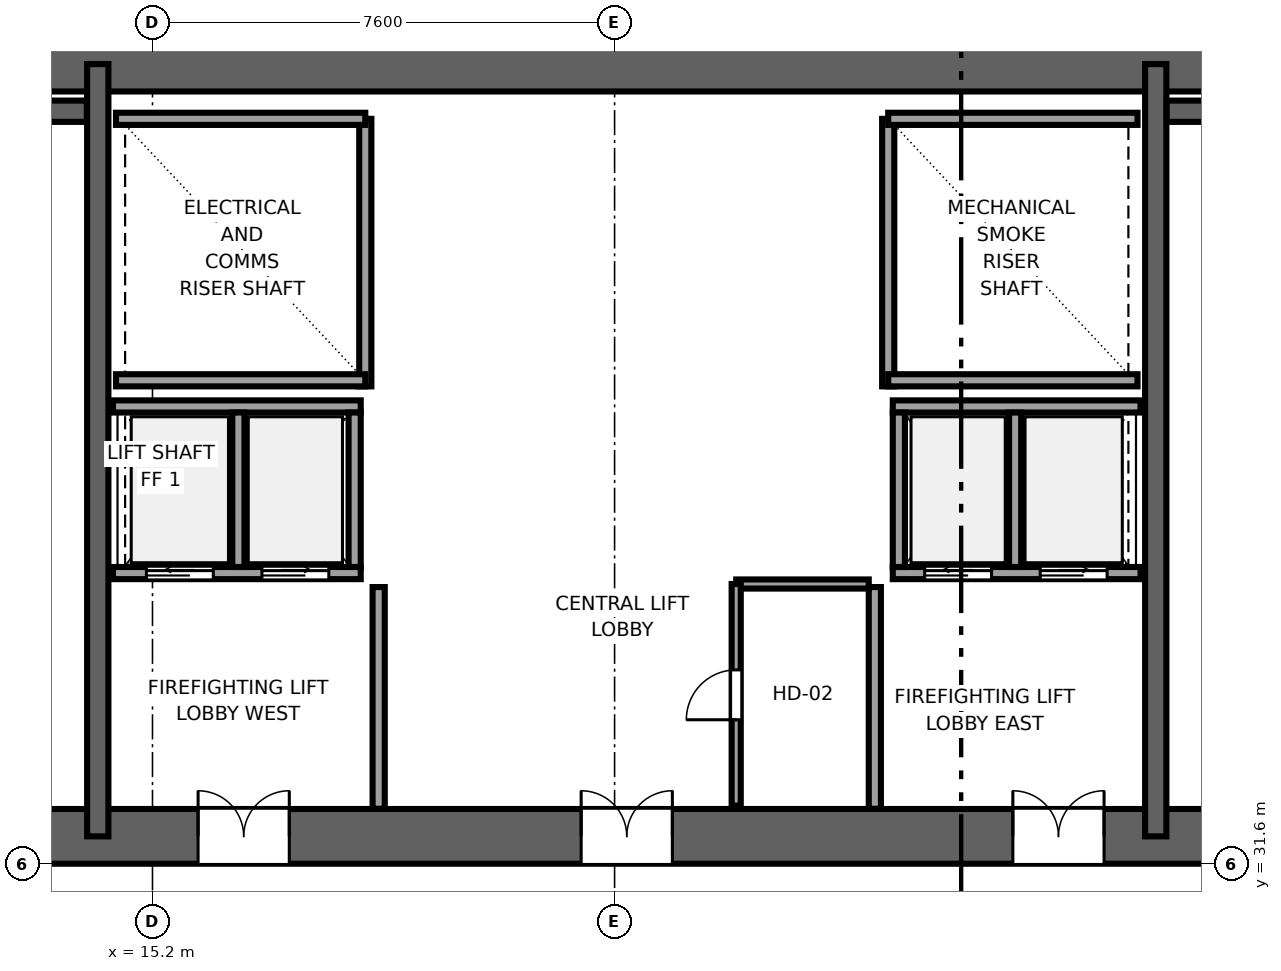
"""IFC4 building model, lengths in metres.
Left out: names, types, materials, properties, quantities, classifications, styles, units other than length and angle.
Written with IfcOpenShell. Run it as: python <this file> out.ifc"""

import sys

from ifc_helpers import new_model, si_unit, direction, frame, frame_2d, origin, place, context, subcontext, project, spatial, rectangle, extrude, source, transform, mapped, element, fill, save


model = new_model("IFC4")
c1 = context("Model", 3, precision=1e-05, world=origin(), true_north=direction((0.0, 1.0)))
c2 = subcontext(c1, "Body", "Model", "MODEL_VIEW")
j1 = project(units=[si_unit("LENGTHUNIT", "METRE"), si_unit("PLANEANGLEUNIT", "RADIAN")], contexts=[c1])
p1 = place(None, origin())
s1 = spatial("IfcSite", under=j1, at=p1, CompositionType="ELEMENT")
p2 = place(p1, origin())
s2 = spatial("IfcBuilding", under=s1, at=p2, CompositionType="ELEMENT")
p3 = place(p2, frame((0.0, 0.0, -9.6)))
s3 = spatial("IfcBuildingStorey", under=s2, at=p3, CompositionType="ELEMENT", Elevation=-9.6)
p4 = place(p3, frame((9.6, 32.05, 0.0), z_axis=(0.0, 0.0, 1.0), x_axis=(1.0, 0.0, 0.0)))
e1 = element("IfcWall", 1, at=p4, inside=s3, PredefinedType="SHEAR", context=c2, shape_type="SweptSolid", body=[
    extrude(rectangle(XDim=26.8, YDim=0.9, at=frame_2d((13.4, 0.0))), origin(), (0.0, 0.0, 1.0), 4.8),
])
p5 = place(p4, frame((7.85, 0.0, 0.0), z_axis=(0.0, 0.0, 1.0), x_axis=(-1.0, 0.0, 0.0)))
e2 = element("IfcOpeningElement", 2, at=p5, cuts=e1, PredefinedType="OPENING", context=c2, shape_type="SweptSolid", body=[
    extrude(rectangle(XDim=1.5, YDim=2.04, at=frame_2d((0.75, 1.02))), frame((0.0, 0.46, 0.0), z_axis=(0.0, -1.0, 0.0), x_axis=(1.0, 0.0, 0.0)), (0.0, 0.0, 1.0), 0.92),
])
p6 = place(p4, frame((14.15, 0.0, 0.0), z_axis=(0.0, 0.0, 1.0), x_axis=(-1.0, 0.0, 0.0)))
e3 = element("IfcOpeningElement", 3, at=p6, cuts=e1, PredefinedType="OPENING", context=c2, shape_type="SweptSolid", body=[
    extrude(rectangle(XDim=1.5, YDim=2.04, at=frame_2d((0.75, 1.02))), frame((0.0, 0.46, 0.0), z_axis=(0.0, -1.0, 0.0), x_axis=(1.0, 0.0, 0.0)), (0.0, 0.0, 1.0), 0.92),
])
p7 = place(p4, frame((21.25, 0.0, 0.0), z_axis=(0.0, 0.0, 1.0), x_axis=(-1.0, 0.0, 0.0)))
e4 = element("IfcOpeningElement", 4, at=p7, cuts=e1, PredefinedType="OPENING", context=c2, shape_type="SweptSolid", body=[
    extrude(rectangle(XDim=1.5, YDim=2.04, at=frame_2d((0.75, 1.02))), frame((0.0, 0.46, 0.0), z_axis=(0.0, -1.0, 0.0), x_axis=(1.0, 0.0, 0.0)), (0.0, 0.0, 1.0), 0.92),
])
p8 = place(p3, frame((9.6, 44.75, 0.0), z_axis=(0.0, 0.0, 1.0), x_axis=(1.0, 0.0, 0.0)))
e5 = element("IfcWall", 5, at=p8, inside=s3, PredefinedType="SHEAR", context=c2, shape_type="SweptSolid", body=[
    extrude(rectangle(XDim=26.8, YDim=0.9, at=frame_2d((13.4, 0.0))), origin(), (0.0, 0.0, 1.0), 4.8),
])
for number, where, z_axis, x_axis in (
    (6, (14.3, 32.05, 0.0), (0.0, 0.0, 1.0), (0.0, 1.0, 0.0)),
    (7, (31.7, 32.05, 0.0), (0.0, 0.0, 1.0), (0.0, 1.0, 0.0)),
):
    element("IfcWall", number, at=place(p3, frame(where, z_axis=z_axis, x_axis=x_axis)), inside=s3, PredefinedType="SHEAR", context=c2, shape_type="SweptSolid", body=[
        extrude(rectangle(XDim=12.7, YDim=0.35, at=frame_2d((6.35, 0.0))), origin(), (0.0, 0.0, 1.0), 4.8),
    ])
for number, where, z_axis, x_axis in (
    (8, (10.52, 43.975, 0.0), (0.0, 0.0, 1.0), (1.0, 0.0, 0.0)),
    (9, (31.88, 43.975, 0.0), (0.0, 0.0, 1.0), (1.0, 0.0, 0.0)),
):
    element("IfcWall", number, at=place(p3, frame(where, z_axis=z_axis, x_axis=x_axis)), inside=s3, PredefinedType="SHEAR", context=c2, shape_type="SweptSolid", body=[
        extrude(rectangle(XDim=3.6, YDim=0.35, at=frame_2d((1.8, 0.0))), origin(), (0.0, 0.0, 1.0), 4.8),
    ])
p9 = place(p3, frame((18.7, 39.45, 0.0), z_axis=(0.0, 0.0, 1.0), x_axis=(0.0, 1.0, 0.0)))
e10 = element("IfcWall", 10, at=p9, inside=s3, PredefinedType="SOLIDWALL", context=c2, shape_type="SweptSolid", body=[
    extrude(rectangle(XDim=4.4, YDim=0.2, at=frame_2d((2.2, 0.0))), origin(), (0.0, 0.0, 1.0), 4.54),
])
for number, where, z_axis, x_axis in (
    (11, (14.6, 39.55, 0.0), (0.0, 0.0, 1.0), (1.0, 0.0, 0.0)),
    (12, (14.6, 43.85, 0.0), (0.0, 0.0, 1.0), (1.0, 0.0, 0.0)),
):
    element("IfcWall", number, at=place(p3, frame(where, z_axis=z_axis, x_axis=x_axis)), inside=s3, PredefinedType="SOLIDWALL", context=c2, shape_type="SweptSolid", body=[
        extrude(rectangle(XDim=4.1, YDim=0.2, at=frame_2d((2.05, 0.0))), origin(), (0.0, 0.0, 1.0), 4.54),
    ])
p10 = place(p3, frame((27.3, 39.45, 0.0), z_axis=(0.0, 0.0, 1.0), x_axis=(0.0, 1.0, 0.0)))
e13 = element("IfcWall", 13, at=p10, inside=s3, PredefinedType="SOLIDWALL", context=c2, shape_type="SweptSolid", body=[
    extrude(rectangle(XDim=4.4, YDim=0.2, at=frame_2d((2.2, 0.0))), origin(), (0.0, 0.0, 1.0), 4.54),
])
for number, where, z_axis, x_axis in (
    (14, (27.3, 39.55, 0.0), (0.0, 0.0, 1.0), (1.0, 0.0, 0.0)),
    (15, (27.3, 43.85, 0.0), (0.0, 0.0, 1.0), (1.0, 0.0, 0.0)),
):
    element("IfcWall", number, at=place(p3, frame(where, z_axis=z_axis, x_axis=x_axis)), inside=s3, PredefinedType="SOLIDWALL", context=c2, shape_type="SweptSolid", body=[
        extrude(rectangle(XDim=4.1, YDim=0.2, at=frame_2d((2.05, 0.0))), origin(), (0.0, 0.0, 1.0), 4.54),
    ])
for number, where, z_axis, x_axis in (
    (16, (18.92, 32.504, 0.0), (0.0, 0.0, 1.0), (0.0, 1.0, 0.0)),
    (17, (27.08, 32.504, 0.0), (0.0, 0.0, 1.0), (0.0, 1.0, 0.0)),
):
    element("IfcWall", number, at=place(p3, frame(where, z_axis=z_axis, x_axis=x_axis)), inside=s3, PredefinedType="SOLIDWALL", context=c2, shape_type="SweptSolid", body=[
        extrude(rectangle(XDim=3.646, YDim=0.2, at=frame_2d((1.823, 0.0))), origin(), (0.0, 0.0, 1.0), 4.54),
    ])
p11 = place(p3, frame((27.375, 36.38, 0.0), z_axis=(0.0, 0.0, 1.0), x_axis=(1.0, 0.0, 0.0)))
e18 = element("IfcWall", 18, at=p11, inside=s3, PredefinedType="SOLIDWALL", context=c2, shape_type="SweptSolid", body=[
    extrude(rectangle(XDim=4.075, YDim=0.2, at=frame_2d((2.038, 0.0))), origin(), (0.0, 0.0, 1.0), 4.54),
])
p12 = place(p11, frame((0.525, 0.0, 0.0)))
e19 = element("IfcOpeningElement", 19, at=p12, cuts=e18, PredefinedType="OPENING", context=c2, shape_type="SweptSolid", body=[
    extrude(rectangle(XDim=1.1, YDim=2.12, at=frame_2d((0.55, 1.06))), frame((0.0, 0.11, 0.0), z_axis=(0.0, -1.0, 0.0), x_axis=(1.0, 0.0, 0.0)), (0.0, 0.0, 1.0), 0.22),
])
p13 = place(p11, frame((2.425, 0.0, 0.0)))
e20 = element("IfcOpeningElement", 20, at=p13, cuts=e18, PredefinedType="OPENING", context=c2, shape_type="SweptSolid", body=[
    extrude(rectangle(XDim=1.1, YDim=2.12, at=frame_2d((0.55, 1.06))), frame((0.0, 0.11, 0.0), z_axis=(0.0, -1.0, 0.0), x_axis=(1.0, 0.0, 0.0)), (0.0, 0.0, 1.0), 0.22),
])
p14 = place(p3, frame((27.375, 39.12, 0.0), z_axis=(0.0, 0.0, 1.0), x_axis=(1.0, 0.0, 0.0)))
e21 = element("IfcWall", 21, at=p14, inside=s3, PredefinedType="SOLIDWALL", context=c2, shape_type="SweptSolid", body=[
    extrude(rectangle(XDim=4.075, YDim=0.2, at=frame_2d((2.038, 0.0))), origin(), (0.0, 0.0, 1.0), 4.54),
])
for number, where, z_axis, x_axis in (
    (22, (27.475, 36.48, 0.0), (0.0, 0.0, 1.0), (0.0, 1.0, 0.0)),
    (23, (29.387, 36.48, 0.0), (0.0, 0.0, 1.0), (0.0, 1.0, 0.0)),
):
    element("IfcWall", number, at=place(p3, frame(where, z_axis=z_axis, x_axis=x_axis)), inside=s3, PredefinedType="SOLIDWALL", context=c2, shape_type="SweptSolid", body=[
        extrude(rectangle(XDim=2.54, YDim=0.2, at=frame_2d((1.27, 0.0))), origin(), (0.0, 0.0, 1.0), 4.54),
    ])
p15 = place(p3, frame((14.55, 36.38, 0.0), z_axis=(0.0, 0.0, 1.0), x_axis=(1.0, 0.0, 0.0)))
e24 = element("IfcWall", 24, at=p15, inside=s3, PredefinedType="SOLIDWALL", context=c2, shape_type="SweptSolid", body=[
    extrude(rectangle(XDim=4.075, YDim=0.2, at=frame_2d((2.038, 0.0))), origin(), (0.0, 0.0, 1.0), 4.54),
])
p16 = place(p15, frame((0.55, 0.0, 0.0)))
e25 = element("IfcOpeningElement", 25, at=p16, cuts=e24, PredefinedType="OPENING", context=c2, shape_type="SweptSolid", body=[
    extrude(rectangle(XDim=1.1, YDim=2.12, at=frame_2d((0.55, 1.06))), frame((0.0, 0.11, 0.0), z_axis=(0.0, -1.0, 0.0), x_axis=(1.0, 0.0, 0.0)), (0.0, 0.0, 1.0), 0.22),
])
p17 = place(p15, frame((2.45, 0.0, 0.0)))
e26 = element("IfcOpeningElement", 26, at=p17, cuts=e24, PredefinedType="OPENING", context=c2, shape_type="SweptSolid", body=[
    extrude(rectangle(XDim=1.1, YDim=2.12, at=frame_2d((0.55, 1.06))), frame((0.0, 0.11, 0.0), z_axis=(0.0, -1.0, 0.0), x_axis=(1.0, 0.0, 0.0)), (0.0, 0.0, 1.0), 0.22),
])
p18 = place(p3, frame((14.55, 39.12, 0.0), z_axis=(0.0, 0.0, 1.0), x_axis=(1.0, 0.0, 0.0)))
e27 = element("IfcWall", 27, at=p18, inside=s3, PredefinedType="SOLIDWALL", context=c2, shape_type="SweptSolid", body=[
    extrude(rectangle(XDim=4.075, YDim=0.2, at=frame_2d((2.038, 0.0))), origin(), (0.0, 0.0, 1.0), 4.54),
])
for number, where, z_axis, x_axis in (
    (28, (18.525, 36.48, 0.0), (0.0, 0.0, 1.0), (0.0, 1.0, 0.0)),
    (29, (16.613, 36.48, 0.0), (0.0, 0.0, 1.0), (0.0, 1.0, 0.0)),
):
    element("IfcWall", number, at=place(p3, frame(where, z_axis=z_axis, x_axis=x_axis)), inside=s3, PredefinedType="SOLIDWALL", context=c2, shape_type="SweptSolid", body=[
        extrude(rectangle(XDim=2.54, YDim=0.2, at=frame_2d((1.27, 0.0))), origin(), (0.0, 0.0, 1.0), 4.54),
    ])
p19 = place(p3, frame((24.8, 36.2, 0.0), z_axis=(0.0, 0.0, 1.0), x_axis=(1.0, 0.0, 0.0)))
e30 = element("IfcWall", 30, at=p19, inside=s3, PredefinedType="PARTITIONING", context=c2, shape_type="SweptSolid", body=[
    extrude(rectangle(XDim=2.18, YDim=0.15, at=frame_2d((1.09, 0.0))), origin(), (0.0, 0.0, 1.0), 4.54),
])
p20 = place(p3, frame((24.8, 32.555, 0.0), z_axis=(0.0, 0.0, 1.0), x_axis=(0.0, 1.0, 0.0)))
e31 = element("IfcWall", 31, at=p20, inside=s3, PredefinedType="PARTITIONING", context=c2, shape_type="SweptSolid", body=[
    extrude(rectangle(XDim=3.645, YDim=0.15, at=frame_2d((1.823, 0.0))), origin(), (0.0, 0.0, 1.0), 4.54),
])
p21 = place(p20, frame((1.413, 0.0, 0.0)))
e32 = element("IfcOpeningElement", 32, at=p21, cuts=e31, PredefinedType="OPENING", context=c2, shape_type="SweptSolid", body=[
    extrude(rectangle(XDim=0.82, YDim=2.01, at=frame_2d((0.41, 1.005))), frame((0.0, 0.085, 0.0), z_axis=(0.0, -1.0, 0.0), x_axis=(1.0, 0.0, 0.0)), (0.0, 0.0, 1.0), 0.17),
])
m1 = source(origin(), c2, "Body", "SweptSolid", [
    extrude(rectangle(XDim=1.5, YDim=2.04, at=frame_2d((0.75, 1.02))), frame((0.0, 0.025, 0.0), z_axis=(0.0, -1.0, 0.0), x_axis=(1.0, 0.0, 0.0)), (0.0, 0.0, 1.0), 0.05),
])
p22 = place(p5, origin())
e33 = element("IfcDoor", 33, at=p22, inside=s3, OperationType="DOUBLE_DOOR_SINGLE_SWING", PredefinedType="DOOR", context=c2, shape_type="MappedRepresentation", body=[
    mapped(m1, transform((0.0, 0.0, 0.0), x_axis=(1.0, 0.0, 0.0), y_axis=(0.0, 1.0, 0.0), z_axis=(0.0, 0.0, 1.0), scale=1.0)),
])
fill(e2, e33)
p23 = place(p6, origin())
e34 = element("IfcDoor", 34, at=p23, inside=s3, OperationType="DOUBLE_DOOR_SINGLE_SWING", PredefinedType="DOOR", context=c2, shape_type="MappedRepresentation", body=[
    mapped(m1, transform((0.0, 0.0, 0.0), x_axis=(1.0, 0.0, 0.0), y_axis=(0.0, 1.0, 0.0), z_axis=(0.0, 0.0, 1.0), scale=1.0)),
])
fill(e3, e34)
p24 = place(p7, origin())
e35 = element("IfcDoor", 35, at=p24, inside=s3, OperationType="DOUBLE_DOOR_SINGLE_SWING", PredefinedType="DOOR", context=c2, shape_type="MappedRepresentation", body=[
    mapped(m1, transform((0.0, 0.0, 0.0), x_axis=(1.0, 0.0, 0.0), y_axis=(0.0, 1.0, 0.0), z_axis=(0.0, 0.0, 1.0), scale=1.0)),
])
fill(e4, e35)
m2 = source(origin(), c2, "Body", "SweptSolid", [
    extrude(rectangle(XDim=1.1, YDim=2.12, at=frame_2d((0.55, 1.06))), frame((0.0, 0.025, 0.0), z_axis=(0.0, -1.0, 0.0), x_axis=(1.0, 0.0, 0.0)), (0.0, 0.0, 1.0), 0.05),
])
p25 = place(p12, origin())
e36 = element("IfcDoor", 36, at=p25, inside=s3, OperationType="SLIDING_TO_LEFT", PredefinedType="DOOR", context=c2, shape_type="MappedRepresentation", body=[
    mapped(m2, transform((0.0, 0.0, 0.0), x_axis=(1.0, 0.0, 0.0), y_axis=(0.0, 1.0, 0.0), z_axis=(0.0, 0.0, 1.0), scale=1.0)),
])
fill(e19, e36)
p26 = place(p13, origin())
e37 = element("IfcDoor", 37, at=p26, inside=s3, OperationType="SLIDING_TO_RIGHT", PredefinedType="DOOR", context=c2, shape_type="MappedRepresentation", body=[
    mapped(m2, transform((0.0, 0.0, 0.0), x_axis=(1.0, 0.0, 0.0), y_axis=(0.0, 1.0, 0.0), z_axis=(0.0, 0.0, 1.0), scale=1.0)),
])
fill(e20, e37)
p27 = place(p16, origin())
e38 = element("IfcDoor", 38, at=p27, inside=s3, OperationType="SLIDING_TO_LEFT", PredefinedType="DOOR", context=c2, shape_type="MappedRepresentation", body=[
    mapped(m2, transform((0.0, 0.0, 0.0), x_axis=(1.0, 0.0, 0.0), y_axis=(0.0, 1.0, 0.0), z_axis=(0.0, 0.0, 1.0), scale=1.0)),
])
fill(e25, e38)
p28 = place(p17, origin())
e39 = element("IfcDoor", 39, at=p28, inside=s3, OperationType="SLIDING_TO_RIGHT", PredefinedType="DOOR", context=c2, shape_type="MappedRepresentation", body=[
    mapped(m2, transform((0.0, 0.0, 0.0), x_axis=(1.0, 0.0, 0.0), y_axis=(0.0, 1.0, 0.0), z_axis=(0.0, 0.0, 1.0), scale=1.0)),
])
fill(e26, e39)
m3 = source(origin(), c2, "Body", "SweptSolid", [
    extrude(rectangle(XDim=0.82, YDim=2.01, at=frame_2d((0.41, 1.005))), frame((0.0, 0.025, 0.0), z_axis=(0.0, -1.0, 0.0), x_axis=(1.0, 0.0, 0.0)), (0.0, 0.0, 1.0), 0.05),
])
p29 = place(p21, origin())
e40 = element("IfcDoor", 40, at=p29, inside=s3, OperationType="SINGLE_SWING_LEFT", PredefinedType="DOOR", context=c2, shape_type="MappedRepresentation", body=[
    mapped(m3, transform((0.0, 0.0, 0.0), x_axis=(1.0, 0.0, 0.0), y_axis=(0.0, 1.0, 0.0), z_axis=(0.0, 0.0, 1.0), scale=1.0)),
])
fill(e32, e40)
save(model, sys.argv[1])
